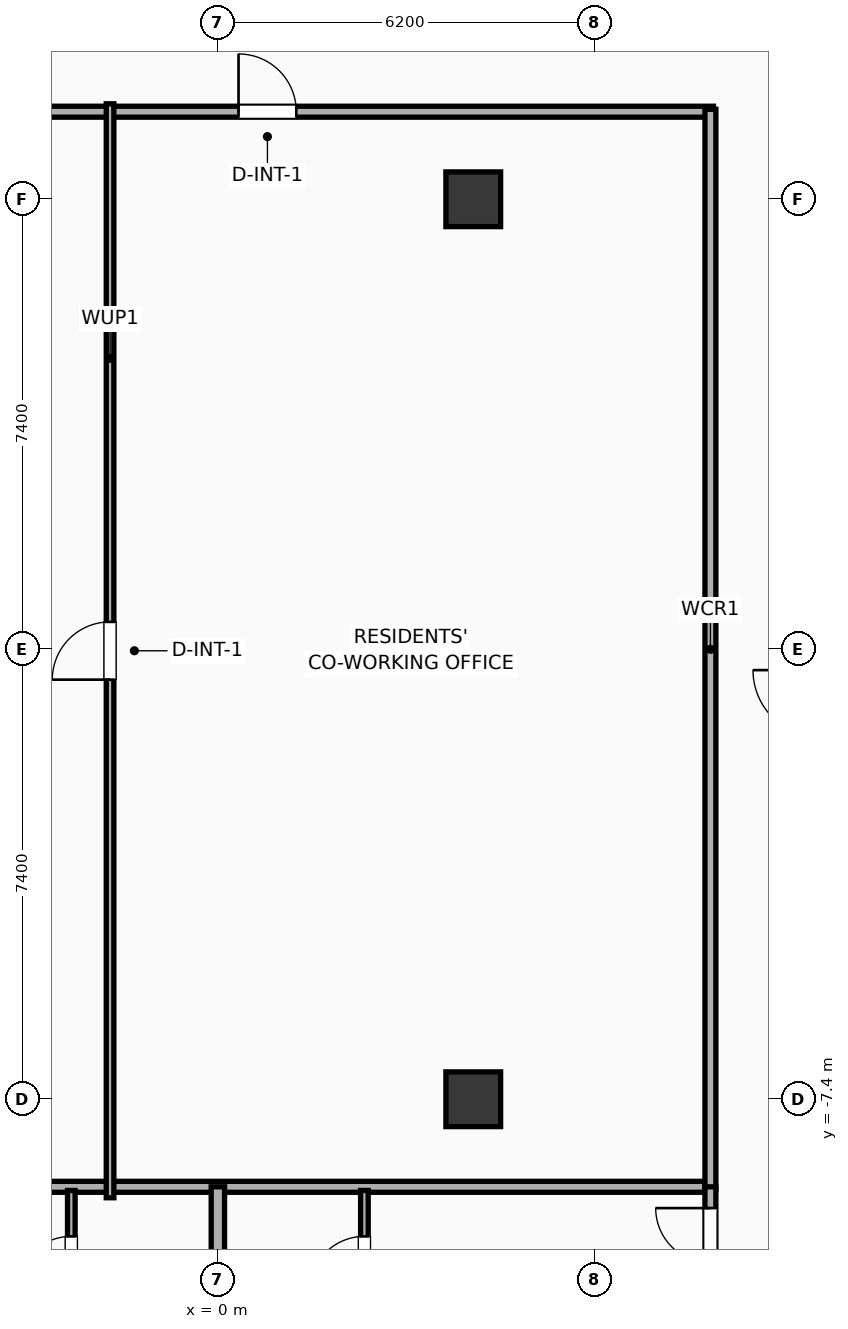
"""IFC4 building model, lengths in metres.
Left out: names, types, materials, properties, quantities, classifications, styles, units other than length and angle.
Written with IfcOpenShell. Run it as: python <this file> out.ifc"""

import sys

from ifc_helpers import new_model, si_unit, direction, frame, frame_2d, origin, origin_2d, place, context, subcontext, project, spatial, rectangle, extrude, element, fill, save


model = new_model("IFC4")
c1 = context("Model", 3, precision=1e-05, world=origin(), true_north=direction((0.0, 1.0)))
c2 = subcontext(c1, "Body", "Model", "MODEL_VIEW")
j1 = project(units=[si_unit("LENGTHUNIT", "METRE"), si_unit("PLANEANGLEUNIT", "RADIAN")], contexts=[c1])
p1 = place(None, origin())
s1 = spatial("IfcSite", under=j1, at=p1, CompositionType="ELEMENT")
p2 = place(p1, origin())
s2 = spatial("IfcBuilding", under=s1, at=p2, CompositionType="ELEMENT")
p3 = place(p2, frame((0.0, 0.0, 250.9)))
s3 = spatial("IfcBuildingStorey", under=s2, at=p3, CompositionType="ELEMENT", Elevation=250.9)
for number, where, z_axis, x_axis in (
    (1, (4.2, -7.4, 0.0), (0.0, 0.0, 1.0), (1.0, 0.0, 0.0)),
    (2, (4.2, 7.4, 0.0), (0.0, 0.0, 1.0), (1.0, 0.0, 0.0)),
):
    element("IfcColumn", number, at=place(p3, frame(where, z_axis=z_axis, x_axis=x_axis)), inside=s3, PredefinedType="COLUMN", context=c2, shape_type="SweptSolid", body=[
        extrude(rectangle(XDim=0.9, YDim=0.9, at=origin_2d()), origin(), (0.0, 0.0, 1.0), 3.9),
    ])
p4 = place(p3, frame((-8.15, 8.84, 0.0), z_axis=(0.0, 0.0, 1.0), x_axis=(1.0, 0.0, 0.0)))
e3 = element("IfcWall", 3, at=p4, inside=s3, PredefinedType="PARTITIONING", context=c2, shape_type="SweptSolid", body=[
    extrude(rectangle(XDim=16.3, YDim=0.18, at=frame_2d((8.15, 0.0))), origin(), (0.0, 0.0, 1.0), 3.5),
])
p5 = place(p4, frame((8.49, 0.0, 0.0)))
e4 = element("IfcOpeningElement", 4, at=p5, cuts=e3, PredefinedType="OPENING", context=c2, shape_type="SweptSolid", body=[
    extrude(rectangle(XDim=0.95, YDim=2.05, at=frame_2d((0.475, 1.025))), frame((0.0, 0.1, 0.0), z_axis=(0.0, -1.0, 0.0), x_axis=(1.0, 0.0, 0.0)), (0.0, 0.0, 1.0), 0.2),
])
p6 = place(p3, frame((-8.15, -8.84, 0.0), z_axis=(0.0, 0.0, 1.0), x_axis=(1.0, 0.0, 0.0)))
e5 = element("IfcWall", 5, at=p6, inside=s3, PredefinedType="PARTITIONING", context=c2, shape_type="SweptSolid", body=[
    extrude(rectangle(XDim=16.3, YDim=0.18, at=frame_2d((8.15, 0.0))), origin(), (0.0, 0.0, 1.0), 3.5),
])
p7 = place(p3, frame((8.1, -8.88, 0.0), z_axis=(0.0, 0.0, 1.0), x_axis=(0.0, 1.0, 0.0)))
e6 = element("IfcWall", 6, at=p7, inside=s3, PredefinedType="PARTITIONING", context=c2, shape_type="SweptSolid", body=[
    extrude(rectangle(XDim=17.76, YDim=0.18, at=frame_2d((8.88, 0.0))), origin(), (0.0, 0.0, 1.0), 3.5),
])
p8 = place(p3, frame((-1.773, -9.02, 0.0), z_axis=(0.0, 0.0, 1.0), x_axis=(0.0, 1.0, 0.0)))
e7 = element("IfcWall", 7, at=p8, inside=s3, PredefinedType="PARTITIONING", context=c2, shape_type="SweptSolid", body=[
    extrude(rectangle(XDim=17.99, YDim=0.125, at=frame_2d((8.995, 0.0))), origin(), (0.0, 0.0, 1.0), 3.5),
])
p9 = place(p8, frame((8.52, 0.0, 0.0)))
e8 = element("IfcOpeningElement", 8, at=p9, cuts=e7, PredefinedType="OPENING", context=c2, shape_type="SweptSolid", body=[
    extrude(rectangle(XDim=0.95, YDim=2.05, at=frame_2d((0.475, 1.025))), frame((0.0, 0.073, 0.0), z_axis=(0.0, -1.0, 0.0), x_axis=(1.0, 0.0, 0.0)), (0.0, 0.0, 1.0), 0.145),
])
p10 = place(p3, frame((-2.41, -11.31, 0.0), z_axis=(0.0, 0.0, 1.0), x_axis=(0.0, 1.0, 0.0)))
e9 = element("IfcWall", 9, at=p10, inside=s3, PredefinedType="PARTITIONING", context=c2, shape_type="SweptSolid", body=[
    extrude(rectangle(XDim=2.41, YDim=0.125, at=frame_2d((1.205, 0.0))), origin(), (0.0, 0.0, 1.0), 3.5),
])
p11 = place(p10, frame((0.755, 0.0, 0.0)))
e10 = element("IfcOpeningElement", 10, at=p11, cuts=e9, PredefinedType="OPENING", context=c2, shape_type="SweptSolid", body=[
    extrude(rectangle(XDim=0.9, YDim=2.05, at=frame_2d((0.45, 1.025))), frame((0.0, 0.073, 0.0), z_axis=(0.0, -1.0, 0.0), x_axis=(1.0, 0.0, 0.0)), (0.0, 0.0, 1.0), 0.145),
])
p12 = place(p3, frame((2.41, -11.31, 0.0), z_axis=(0.0, 0.0, 1.0), x_axis=(0.0, 1.0, 0.0)))
e11 = element("IfcWall", 11, at=p12, inside=s3, PredefinedType="PARTITIONING", context=c2, shape_type="SweptSolid", body=[
    extrude(rectangle(XDim=2.41, YDim=0.125, at=frame_2d((1.205, 0.0))), origin(), (0.0, 0.0, 1.0), 2.39),
])
p13 = place(p12, frame((0.755, 0.0, 0.0)))
e12 = element("IfcOpeningElement", 12, at=p13, cuts=e11, PredefinedType="OPENING", context=c2, shape_type="SweptSolid", body=[
    extrude(rectangle(XDim=0.9, YDim=2.05, at=frame_2d((0.45, 1.025))), frame((0.0, 0.073, 0.0), z_axis=(0.0, -1.0, 0.0), x_axis=(1.0, 0.0, 0.0)), (0.0, 0.0, 1.0), 0.145),
])
p14 = place(p3, frame((8.1, -18.83, 0.0), z_axis=(0.0, 0.0, 1.0), x_axis=(0.0, 1.0, 0.0)))
e13 = element("IfcWall", 13, at=p14, inside=s3, PredefinedType="PARTITIONING", context=c2, shape_type="SweptSolid", body=[
    extrude(rectangle(XDim=9.99, YDim=0.18, at=frame_2d((4.995, 0.0))), origin(), (0.0, 0.0, 1.0), 3.5),
])
p15 = place(p14, frame((8.74, 0.0, 0.0)))
e14 = element("IfcOpeningElement", 14, at=p15, cuts=e13, PredefinedType="OPENING", context=c2, shape_type="SweptSolid", body=[
    extrude(rectangle(XDim=0.9, YDim=2.05, at=frame_2d((0.45, 1.025))), frame((0.0, 0.1, 0.0), z_axis=(0.0, -1.0, 0.0), x_axis=(1.0, 0.0, 0.0)), (0.0, 0.0, 1.0), 0.2),
])
p16 = place(p3, frame((0.0, -18.83, 0.0), z_axis=(0.0, 0.0, 1.0), x_axis=(0.0, 1.0, 0.0)))
e15 = element("IfcWall", 15, at=p16, inside=s3, PredefinedType="PARTITIONING", context=c2, shape_type="SweptSolid", body=[
    extrude(rectangle(XDim=9.99, YDim=0.22, at=frame_2d((4.995, 0.0))), origin(), (0.0, 0.0, 1.0), 2.39),
])
p17 = place(p5, origin())
e16 = element("IfcDoor", 16, at=p17, inside=s3, OperationType="SINGLE_SWING_LEFT", PredefinedType="DOOR", context=c2, shape_type="SweptSolid", body=[
    extrude(rectangle(XDim=0.95, YDim=2.05, at=frame_2d((0.475, 1.025))), frame((0.0, 0.025, 0.0), z_axis=(0.0, -1.0, 0.0), x_axis=(1.0, 0.0, 0.0)), (0.0, 0.0, 1.0), 0.05),
])
fill(e4, e16)
p18 = place(p9, origin())
e17 = element("IfcDoor", 17, at=p18, inside=s3, OperationType="SINGLE_SWING_LEFT", PredefinedType="DOOR", context=c2, shape_type="SweptSolid", body=[
    extrude(rectangle(XDim=0.95, YDim=2.05, at=frame_2d((0.475, 1.025))), frame((0.0, 0.025, 0.0), z_axis=(0.0, -1.0, 0.0), x_axis=(1.0, 0.0, 0.0)), (0.0, 0.0, 1.0), 0.05),
])
fill(e8, e17)
p19 = place(p11, origin())
e18 = element("IfcDoor", 18, at=p19, inside=s3, OperationType="SINGLE_SWING_LEFT", PredefinedType="DOOR", context=c2, shape_type="SweptSolid", body=[
    extrude(rectangle(XDim=0.9, YDim=2.05, at=frame_2d((0.45, 1.025))), frame((0.0, 0.025, 0.0), z_axis=(0.0, -1.0, 0.0), x_axis=(1.0, 0.0, 0.0)), (0.0, 0.0, 1.0), 0.05),
])
fill(e10, e18)
p20 = place(p13, origin())
e19 = element("IfcDoor", 19, at=p20, inside=s3, OperationType="SINGLE_SWING_LEFT", PredefinedType="DOOR", context=c2, shape_type="SweptSolid", body=[
    extrude(rectangle(XDim=0.9, YDim=2.05, at=frame_2d((0.45, 1.025))), frame((0.0, 0.025, 0.0), z_axis=(0.0, -1.0, 0.0), x_axis=(1.0, 0.0, 0.0)), (0.0, 0.0, 1.0), 0.05),
])
fill(e12, e19)
p21 = place(p15, origin())
e20 = element("IfcDoor", 20, at=p21, inside=s3, OperationType="SINGLE_SWING_RIGHT", PredefinedType="DOOR", context=c2, shape_type="SweptSolid", body=[
    extrude(rectangle(XDim=0.9, YDim=2.05, at=frame_2d((0.45, 1.025))), frame((0.0, 0.025, 0.0), z_axis=(0.0, -1.0, 0.0), x_axis=(1.0, 0.0, 0.0)), (0.0, 0.0, 1.0), 0.05),
])
fill(e14, e20)
save(model, sys.argv[1])
